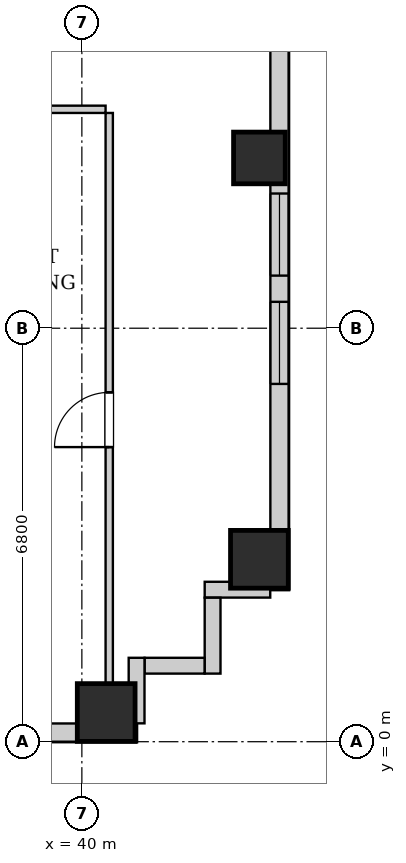
"""IFC4 building model, lengths in metres.
Left out: names, types, materials, properties, quantities, classifications, styles, units other than length and angle.
Written with IfcOpenShell. Run it as: python <this file> out.ifc"""

import sys

from ifc_helpers import new_model, si_unit, direction, frame, frame_2d, origin, origin_2d, place, context, subcontext, project, spatial, rectangle, extrude, element, fill, save


model = new_model("IFC4")
c1 = context("Model", 3, precision=1e-05, world=origin(), true_north=direction((0.0, 1.0)))
c2 = subcontext(c1, "Body", "Model", "MODEL_VIEW")
j1 = project(units=[si_unit("LENGTHUNIT", "METRE"), si_unit("PLANEANGLEUNIT", "RADIAN")], contexts=[c1])
p1 = place(None, origin())
s1 = spatial("IfcSite", under=j1, at=p1, CompositionType="ELEMENT")
p2 = place(p1, origin())
s2 = spatial("IfcBuilding", under=s1, at=p2, CompositionType="ELEMENT")
p3 = place(p2, frame((0.0, 0.0, 81.5)))
s3 = spatial("IfcBuildingStorey", under=s2, at=p3, CompositionType="ELEMENT", Elevation=81.5)
for number, where, z_axis, x_axis in (
    (1, (40.4, 0.48, 0.0), (0.0, 0.0, 1.0), (1.0, 0.0, 0.0)),
    (2, (42.92, 3.0, 0.0), (0.0, 0.0, 1.0), (1.0, 0.0, 0.0)),
):
    element("IfcColumn", number, at=place(p3, frame(where, z_axis=z_axis, x_axis=x_axis)), inside=s3, PredefinedType="COLUMN", context=c2, shape_type="SweptSolid", body=[
        extrude(rectangle(XDim=0.95, YDim=0.95, at=origin_2d()), origin(), (0.0, 0.0, 1.0), 3.2),
    ])
p4 = place(p3, frame((42.92, 9.6, 0.0), z_axis=(0.0, 0.0, 1.0), x_axis=(1.0, 0.0, 0.0)))
e3 = element("IfcColumn", 3, at=p4, inside=s3, PredefinedType="COLUMN", context=c2, shape_type="SweptSolid", body=[
    extrude(rectangle(XDim=0.85, YDim=0.85, at=origin_2d()), origin(), (0.0, 0.0, 1.0), 3.2),
])
p5 = place(p3, frame((43.25, 24.6, 0.0), z_axis=(0.0, 0.0, 1.0), x_axis=(0.0, -1.0, 0.0)))
e4 = element("IfcWall", 4, at=p5, inside=s3, PredefinedType="SOLIDWALL", context=c2, shape_type="SweptSolid", body=[
    extrude(rectangle(XDim=22.1, YDim=0.3, at=frame_2d((11.05, 0.0))), origin(), (0.0, 0.0, 1.0), 2.94),
])
p6 = place(p5, frame((17.366, 0.0, 0.55)))
e5 = element("IfcOpeningElement", 5, at=p6, cuts=e4, PredefinedType="OPENING", context=c2, shape_type="SweptSolid", body=[
    extrude(rectangle(XDim=1.35, YDim=1.2, at=frame_2d((0.675, 0.6))), frame((0.0, 0.16, 0.0), z_axis=(0.0, -1.0, 0.0), x_axis=(1.0, 0.0, 0.0)), (0.0, 0.0, 1.0), 0.32),
])
p7 = place(p5, frame((15.585, 0.0, 0.55)))
e6 = element("IfcOpeningElement", 6, at=p7, cuts=e4, PredefinedType="OPENING", context=c2, shape_type="SweptSolid", body=[
    extrude(rectangle(XDim=1.35, YDim=1.2, at=frame_2d((0.675, 0.6))), frame((0.0, 0.16, 0.0), z_axis=(0.0, -1.0, 0.0), x_axis=(1.0, 0.0, 0.0)), (0.0, 0.0, 1.0), 0.32),
])
p8 = place(p3, frame((40.9, 0.15, 0.0), z_axis=(0.0, 0.0, 1.0), x_axis=(-1.0, 0.0, 0.0)))
e7 = element("IfcWall", 7, at=p8, inside=s3, PredefinedType="SOLIDWALL", context=c2, shape_type="SweptSolid", body=[
    extrude(rectangle(XDim=22.5, YDim=0.3, at=frame_2d((11.25, 0.0))), origin(), (0.0, 0.0, 1.0), 2.94),
])
p9 = place(p8, frame((19.425, 0.0, 0.55)))
e8 = element("IfcOpeningElement", 8, at=p9, cuts=e7, PredefinedType="OPENING", context=c2, shape_type="SweptSolid", body=[
    extrude(rectangle(XDim=1.35, YDim=1.2, at=frame_2d((0.675, 0.6))), frame((0.0, 0.16, 0.0), z_axis=(0.0, -1.0, 0.0), x_axis=(1.0, 0.0, 0.0)), (0.0, 0.0, 1.0), 0.32),
])
p10 = place(p8, frame((12.55, 0.0, 0.55)))
e9 = element("IfcOpeningElement", 9, at=p10, cuts=e7, PredefinedType="OPENING", context=c2, shape_type="SweptSolid", body=[
    extrude(rectangle(XDim=0.85, YDim=1.2, at=frame_2d((0.425, 0.6))), frame((0.0, 0.16, 0.0), z_axis=(0.0, -1.0, 0.0), x_axis=(1.0, 0.0, 0.0)), (0.0, 0.0, 1.0), 0.32),
])
p11 = place(p8, frame((9.75, 0.0, 0.55)))
e10 = element("IfcOpeningElement", 10, at=p11, cuts=e7, PredefinedType="OPENING", context=c2, shape_type="SweptSolid", body=[
    extrude(rectangle(XDim=1.35, YDim=1.2, at=frame_2d((0.675, 0.6))), frame((0.0, 0.16, 0.0), z_axis=(0.0, -1.0, 0.0), x_axis=(1.0, 0.0, 0.0)), (0.0, 0.0, 1.0), 0.32),
])
p12 = place(p8, frame((6.265, 0.0, 0.55)))
e11 = element("IfcOpeningElement", 11, at=p12, cuts=e7, PredefinedType="OPENING", context=c2, shape_type="SweptSolid", body=[
    extrude(rectangle(XDim=0.85, YDim=1.2, at=frame_2d((0.425, 0.6))), frame((0.0, 0.16, 0.0), z_axis=(0.0, -1.0, 0.0), x_axis=(1.0, 0.0, 0.0)), (0.0, 0.0, 1.0), 0.32),
])
p13 = place(p8, frame((2.325, 0.0, 0.55)))
e12 = element("IfcOpeningElement", 12, at=p13, cuts=e7, PredefinedType="OPENING", context=c2, shape_type="SweptSolid", body=[
    extrude(rectangle(XDim=1.35, YDim=1.2, at=frame_2d((0.675, 0.6))), frame((0.0, 0.16, 0.0), z_axis=(0.0, -1.0, 0.0), x_axis=(1.0, 0.0, 0.0)), (0.0, 0.0, 1.0), 0.32),
])
p14 = place(p3, frame((43.098, 2.5, 0.0), z_axis=(0.0, 0.0, 1.0), x_axis=(-1.0, 0.0, 0.0)))
e13 = element("IfcWall", 13, at=p14, inside=s3, PredefinedType="SOLIDWALL", context=c2, shape_type="SweptSolid", body=[
    extrude(rectangle(XDim=1.078, YDim=0.26, at=frame_2d((0.539, 0.0))), origin(), (0.0, 0.0, 1.0), 2.94),
])
p15 = place(p3, frame((42.15, 2.368, 0.0), z_axis=(0.0, 0.0, 1.0), x_axis=(0.0, -1.0, 0.0)))
e14 = element("IfcWall", 14, at=p15, inside=s3, PredefinedType="SOLIDWALL", context=c2, shape_type="SweptSolid", body=[
    extrude(rectangle(XDim=1.248, YDim=0.26, at=frame_2d((0.624, 0.0))), origin(), (0.0, 0.0, 1.0), 2.94),
])
p16 = place(p3, frame((42.018, 1.25, 0.0), z_axis=(0.0, 0.0, 1.0), x_axis=(-1.0, 0.0, 0.0)))
e15 = element("IfcWall", 15, at=p16, inside=s3, PredefinedType="SOLIDWALL", context=c2, shape_type="SweptSolid", body=[
    extrude(rectangle(XDim=0.986, YDim=0.26, at=frame_2d((0.493, 0.0))), origin(), (0.0, 0.0, 1.0), 2.94),
])
p17 = place(p3, frame((40.9, 1.38, 0.0), z_axis=(0.0, 0.0, 1.0), x_axis=(0.0, -1.0, 0.0)))
e16 = element("IfcWall", 16, at=p17, inside=s3, PredefinedType="SOLIDWALL", context=c2, shape_type="SweptSolid", body=[
    extrude(rectangle(XDim=1.078, YDim=0.26, at=frame_2d((0.539, 0.0))), origin(), (0.0, 0.0, 1.0), 2.94),
])
p18 = place(p3, frame((36.12, 10.4, 0.0), z_axis=(0.0, 0.0, 1.0), x_axis=(1.0, 0.0, 0.0)))
e17 = element("IfcWall", 17, at=p18, inside=s3, PredefinedType="PARTITIONING", context=c2, shape_type="SweptSolid", body=[
    extrude(rectangle(XDim=4.27, YDim=0.12, at=frame_2d((2.135, 0.0))), origin(), (0.0, 0.0, 1.0), 2.94),
])
p19 = place(p18, frame((1.685, 0.0, 0.0)))
e18 = element("IfcOpeningElement", 18, at=p19, cuts=e17, PredefinedType="OPENING", context=c2, shape_type="SweptSolid", body=[
    extrude(rectangle(XDim=0.9, YDim=2.05, at=frame_2d((0.45, 1.025))), frame((0.0, 0.07, 0.0), z_axis=(0.0, -1.0, 0.0), x_axis=(1.0, 0.0, 0.0)), (0.0, 0.0, 1.0), 0.14),
])
p20 = place(p3, frame((40.45, 0.28, 0.0), z_axis=(0.0, 0.0, 1.0), x_axis=(0.0, 1.0, 0.0)))
e19 = element("IfcWall", 19, at=p20, inside=s3, PredefinedType="PARTITIONING", context=c2, shape_type="SweptSolid", body=[
    extrude(rectangle(XDim=10.06, YDim=0.12, at=frame_2d((5.03, 0.0))), origin(), (0.0, 0.0, 1.0), 2.94),
])
p21 = place(p20, frame((4.565, 0.0, 0.0)))
e20 = element("IfcOpeningElement", 20, at=p21, cuts=e19, PredefinedType="OPENING", context=c2, shape_type="SweptSolid", body=[
    extrude(rectangle(XDim=0.9, YDim=2.05, at=frame_2d((0.45, 1.025))), frame((0.0, 0.07, 0.0), z_axis=(0.0, -1.0, 0.0), x_axis=(1.0, 0.0, 0.0)), (0.0, 0.0, 1.0), 0.14),
])
p22 = place(p21, origin())
e21 = element("IfcDoor", 21, at=p22, inside=s3, OperationType="SINGLE_SWING_LEFT", PredefinedType="DOOR", context=c2, shape_type="SweptSolid", body=[
    extrude(rectangle(XDim=0.9, YDim=2.05, at=frame_2d((0.45, 1.025))), frame((0.0, 0.025, 0.0), z_axis=(0.0, -1.0, 0.0), x_axis=(1.0, 0.0, 0.0)), (0.0, 0.0, 1.0), 0.05),
])
fill(e20, e21)
p23 = place(p6, origin())
e22 = element("IfcWindow", 22, at=p23, inside=s3, PartitioningType="SINGLE_PANEL", PredefinedType="WINDOW", context=c2, shape_type="SweptSolid", body=[
    extrude(rectangle(XDim=1.35, YDim=1.2, at=frame_2d((0.675, 0.6))), frame((0.0, 0.03, 0.0), z_axis=(0.0, -1.0, 0.0), x_axis=(1.0, 0.0, 0.0)), (0.0, 0.0, 1.0), 0.06),
])
fill(e5, e22)
p24 = place(p7, origin())
e23 = element("IfcWindow", 23, at=p24, inside=s3, PartitioningType="SINGLE_PANEL", PredefinedType="WINDOW", context=c2, shape_type="SweptSolid", body=[
    extrude(rectangle(XDim=1.35, YDim=1.2, at=frame_2d((0.675, 0.6))), frame((0.0, 0.03, 0.0), z_axis=(0.0, -1.0, 0.0), x_axis=(1.0, 0.0, 0.0)), (0.0, 0.0, 1.0), 0.06),
])
fill(e6, e23)
save(model, sys.argv[1])
